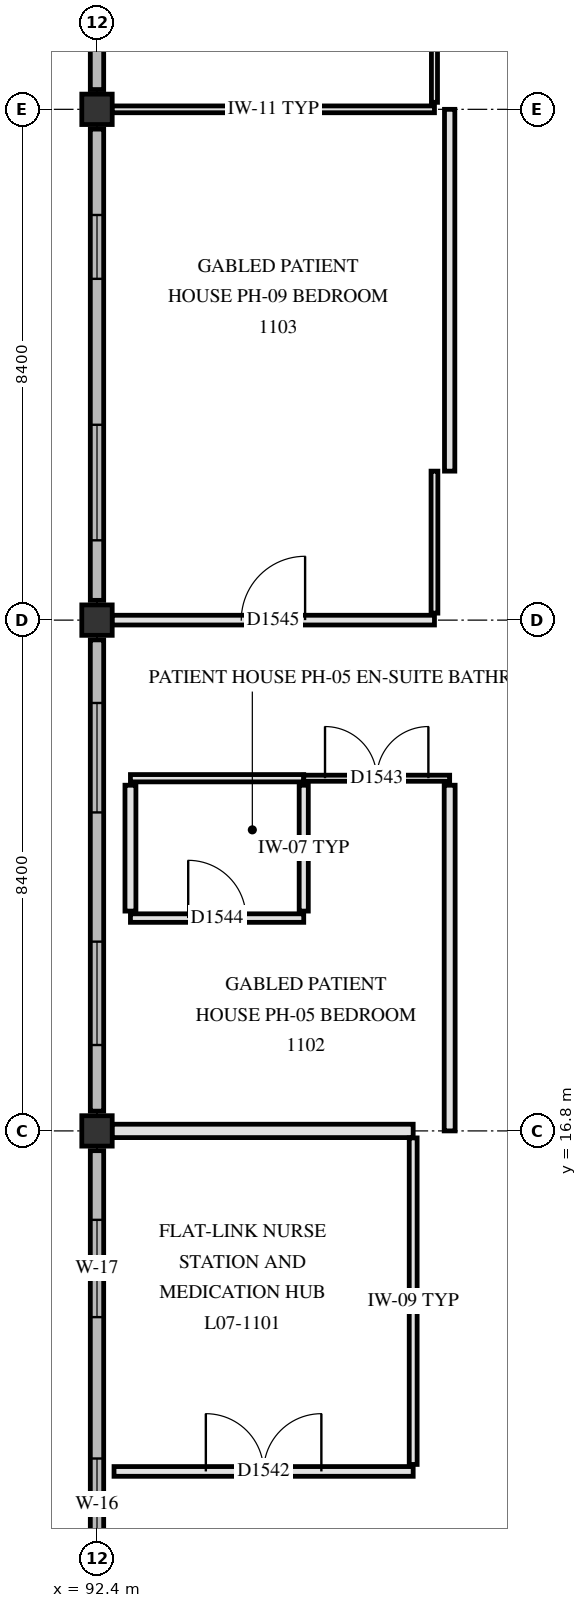
"""IFC4 building model, lengths in metres.
Left out: names, types, materials, properties, quantities, classifications, styles, units other than length and angle.
Written with IfcOpenShell. Run it as: python <this file> out.ifc"""

import sys

from ifc_helpers import new_model, si_unit, direction, frame, frame_2d, origin, origin_2d, place, context, subcontext, project, spatial, polyline, rectangle, outline, extrude, element, fill, save


model = new_model("IFC4")
c1 = context("Model", 3, precision=1e-05, world=origin(), true_north=direction((0.0, 1.0)))
c2 = subcontext(c1, "Body", "Model", "MODEL_VIEW")
j1 = project(units=[si_unit("LENGTHUNIT", "METRE"), si_unit("PLANEANGLEUNIT", "RADIAN")], contexts=[c1])
p1 = place(None, origin())
s1 = spatial("IfcSite", under=j1, at=p1, CompositionType="ELEMENT")
p2 = place(p1, origin())
s2 = spatial("IfcBuilding", under=s1, at=p2, CompositionType="ELEMENT")
p3 = place(p2, frame((0.0, 0.0, 30.3)))
s3 = spatial("IfcBuildingStorey", under=s2, at=p3, CompositionType="ELEMENT", Elevation=30.3)
for number, where, z_axis, x_axis in (
    (1, (92.4, 16.8, 0.0), (0.0, 0.0, 1.0), (1.0, 0.0, 0.0)),
    (2, (92.4, 25.2, 0.0), (0.0, 0.0, 1.0), (1.0, 0.0, 0.0)),
    (3, (92.4, 33.6, 0.0), (0.0, 0.0, 1.0), (1.0, 0.0, 0.0)),
):
    element("IfcColumn", number, at=place(p3, frame(where, z_axis=z_axis, x_axis=x_axis)), inside=s3, PredefinedType="COLUMN", context=c2, shape_type="SweptSolid", body=[
        extrude(rectangle(XDim=0.5, YDim=0.5, at=origin_2d()), origin(), (0.0, 0.0, 1.0), 3.9),
    ])
p4 = place(p3, frame((92.4, 8.725, 0.0), z_axis=(0.0, 0.0, 1.0), x_axis=(0.0, 1.0, 0.0)))
e4 = element("IfcWall", 4, at=p4, inside=s3, PredefinedType="SOLIDWALL", context=c2, shape_type="SweptSolid", body=[
    extrude(rectangle(XDim=7.75, YDim=0.22, at=frame_2d((3.875, 0.0))), origin(), (0.0, 0.0, 1.0), 3.42),
])
p5 = place(p4, frame((1.188, 0.0, 0.85)))
e5 = element("IfcOpeningElement", 5, at=p5, cuts=e4, PredefinedType="OPENING", context=c2, shape_type="SweptSolid", body=[
    extrude(rectangle(XDim=1.5, YDim=1.42, at=frame_2d((0.75, 0.71))), frame((0.0, 0.12, 0.0), z_axis=(0.0, -1.0, 0.0), x_axis=(1.0, 0.0, 0.0)), (0.0, 0.0, 1.0), 0.24),
])
p6 = place(p4, frame((5.012, 0.0, 0.85)))
e6 = element("IfcOpeningElement", 6, at=p6, cuts=e4, PredefinedType="OPENING", context=c2, shape_type="SweptSolid", body=[
    extrude(rectangle(XDim=1.6, YDim=1.42, at=frame_2d((0.8, 0.71))), frame((0.0, 0.12, 0.0), z_axis=(0.0, -1.0, 0.0), x_axis=(1.0, 0.0, 0.0)), (0.0, 0.0, 1.0), 0.24),
])
p7 = place(p3, frame((92.4, 17.125, 0.0), z_axis=(0.0, 0.0, 1.0), x_axis=(0.0, 1.0, 0.0)))
e7 = element("IfcWall", 7, at=p7, inside=s3, PredefinedType="SOLIDWALL", context=c2, shape_type="SweptSolid", body=[
    extrude(rectangle(XDim=7.75, YDim=0.22, at=frame_2d((3.875, 0.0))), origin(), (0.0, 0.0, 1.0), 3.42),
])
p8 = place(p7, frame((1.087, 0.0, 0.85)))
e8 = element("IfcOpeningElement", 8, at=p8, cuts=e7, PredefinedType="OPENING", context=c2, shape_type="SweptSolid", body=[
    extrude(rectangle(XDim=1.7, YDim=1.42, at=frame_2d((0.85, 0.71))), frame((0.0, 0.12, 0.0), z_axis=(0.0, -1.0, 0.0), x_axis=(1.0, 0.0, 0.0)), (0.0, 0.0, 1.0), 0.24),
])
p9 = place(p7, frame((4.913, 0.0, 0.85)))
e9 = element("IfcOpeningElement", 9, at=p9, cuts=e7, PredefinedType="OPENING", context=c2, shape_type="SweptSolid", body=[
    extrude(rectangle(XDim=1.8, YDim=1.42, at=frame_2d((0.9, 0.71))), frame((0.0, 0.12, 0.0), z_axis=(0.0, -1.0, 0.0), x_axis=(1.0, 0.0, 0.0)), (0.0, 0.0, 1.0), 0.24),
])
p10 = place(p3, frame((92.4, 25.525, 0.0), z_axis=(0.0, 0.0, 1.0), x_axis=(0.0, 1.0, 0.0)))
e10 = element("IfcWall", 10, at=p10, inside=s3, PredefinedType="SOLIDWALL", context=c2, shape_type="SweptSolid", body=[
    extrude(outline(polyline([(0.0, 0.0), (7.75, 0.0), (7.75, 3.42), (3.875, 5.76), (0.0, 3.42), (0.0, 0.0)])), frame((0.0, 0.11, 0.0), z_axis=(0.0, -1.0, 0.0), x_axis=(1.0, 0.0, 0.0)), (0.0, 0.0, 1.0), 0.22),
])
p11 = place(p10, frame((0.988, 0.0, 0.85)))
e11 = element("IfcOpeningElement", 11, at=p11, cuts=e10, PredefinedType="OPENING", context=c2, shape_type="SweptSolid", body=[
    extrude(rectangle(XDim=1.9, YDim=1.42, at=frame_2d((0.95, 0.71))), frame((0.0, 0.12, 0.0), z_axis=(0.0, -1.0, 0.0), x_axis=(1.0, 0.0, 0.0)), (0.0, 0.0, 1.0), 0.24),
])
p12 = place(p10, frame((5.288, 0.0, 0.85)))
e12 = element("IfcOpeningElement", 12, at=p12, cuts=e10, PredefinedType="OPENING", context=c2, shape_type="SweptSolid", body=[
    extrude(rectangle(XDim=1.05, YDim=1.54, at=frame_2d((0.525, 0.77))), frame((0.0, 0.12, 0.0), z_axis=(0.0, -1.0, 0.0), x_axis=(1.0, 0.0, 0.0)), (0.0, 0.0, 1.0), 0.24),
])
p13 = place(p3, frame((92.4, 33.925, 0.0), z_axis=(0.0, 0.0, 1.0), x_axis=(0.0, 1.0, 0.0)))
e13 = element("IfcWall", 13, at=p13, inside=s3, PredefinedType="SOLIDWALL", context=c2, shape_type="SweptSolid", body=[
    extrude(outline(polyline([(0.0, 0.0), (7.75, 0.0), (7.75, 3.42), (3.875, 5.76), (0.0, 3.42), (0.0, 0.0)])), frame((0.0, 0.11, 0.0), z_axis=(0.0, -1.0, 0.0), x_axis=(1.0, 0.0, 0.0)), (0.0, 0.0, 1.0), 0.22),
])
p14 = place(p13, frame((1.363, 0.0, 0.85)))
e14 = element("IfcOpeningElement", 14, at=p14, cuts=e13, PredefinedType="OPENING", context=c2, shape_type="SweptSolid", body=[
    extrude(rectangle(XDim=1.15, YDim=1.54, at=frame_2d((0.575, 0.77))), frame((0.0, 0.12, 0.0), z_axis=(0.0, -1.0, 0.0), x_axis=(1.0, 0.0, 0.0)), (0.0, 0.0, 1.0), 0.24),
])
p15 = place(p13, frame((5.188, 0.0, 0.85)))
e15 = element("IfcOpeningElement", 15, at=p15, cuts=e13, PredefinedType="OPENING", context=c2, shape_type="SweptSolid", body=[
    extrude(rectangle(XDim=1.25, YDim=1.54, at=frame_2d((0.625, 0.77))), frame((0.0, 0.12, 0.0), z_axis=(0.0, -1.0, 0.0), x_axis=(1.0, 0.0, 0.0)), (0.0, 0.0, 1.0), 0.24),
])
p16 = place(p3, frame((92.68, 11.2, 0.0), z_axis=(0.0, 0.0, 1.0), x_axis=(1.0, 0.0, 0.0)))
e16 = element("IfcWall", 16, at=p16, inside=s3, PredefinedType="PARTITIONING", context=c2, shape_type="SweptSolid", body=[
    extrude(rectangle(XDim=4.92, YDim=0.16, at=frame_2d((2.46, 0.0))), origin(), (0.0, 0.0, 1.0), 3.41),
])
p17 = place(p16, frame((1.51, 0.0, 0.0)))
e17 = element("IfcOpeningElement", 17, at=p17, cuts=e16, PredefinedType="OPENING", context=c2, shape_type="SweptSolid", body=[
    extrude(rectangle(XDim=1.9, YDim=2.3, at=frame_2d((0.95, 1.15))), frame((0.0, 0.09, 0.0), z_axis=(0.0, -1.0, 0.0), x_axis=(1.0, 0.0, 0.0)), (0.0, 0.0, 1.0), 0.18),
])
p18 = place(p3, frame((92.645, 16.8, 0.0), z_axis=(0.0, 0.0, 1.0), x_axis=(1.0, 0.0, 0.0)))
e18 = element("IfcWall", 18, at=p18, inside=s3, PredefinedType="PARTITIONING", context=c2, shape_type="SweptSolid", body=[
    extrude(rectangle(XDim=4.955, YDim=0.22, at=frame_2d((2.478, 0.0))), origin(), (0.0, 0.0, 1.0), 3.25),
])
p19 = place(p3, frame((92.95, 20.3, 0.0), z_axis=(0.0, 0.0, 1.0), x_axis=(1.0, 0.0, 0.0)))
e19 = element("IfcWall", 19, at=p19, inside=s3, PredefinedType="PARTITIONING", context=c2, shape_type="SweptSolid", body=[
    extrude(rectangle(XDim=2.85, YDim=0.14, at=frame_2d((1.425, 0.0))), origin(), (0.0, 0.0, 1.0), 3.65),
])
p20 = place(p19, frame((0.95, 0.0, 0.0)))
e20 = element("IfcOpeningElement", 20, at=p20, cuts=e19, PredefinedType="OPENING", context=c2, shape_type="SweptSolid", body=[
    extrude(rectangle(XDim=0.95, YDim=2.1, at=frame_2d((0.475, 1.05))), frame((0.0, 0.08, 0.0), z_axis=(0.0, -1.0, 0.0), x_axis=(1.0, 0.0, 0.0)), (0.0, 0.0, 1.0), 0.16),
])
p21 = place(p3, frame((92.95, 22.6, 0.0), z_axis=(0.0, 0.0, 1.0), x_axis=(1.0, 0.0, 0.0)))
e21 = element("IfcWall", 21, at=p21, inside=s3, PredefinedType="PARTITIONING", context=c2, shape_type="SweptSolid", body=[
    extrude(rectangle(XDim=2.85, YDim=0.12, at=frame_2d((1.425, 0.0))), origin(), (0.0, 0.0, 1.0), 3.65),
])
p22 = place(p3, frame((95.8, 22.6, 0.0), z_axis=(0.0, 0.0, 1.0), x_axis=(1.0, 0.0, 0.0)))
e22 = element("IfcWall", 22, at=p22, inside=s3, PredefinedType="PARTITIONING", context=c2, shape_type="SweptSolid", body=[
    extrude(rectangle(XDim=2.4, YDim=0.1, at=frame_2d((1.2, 0.0))), origin(), (0.0, 0.0, 1.0), 3.65),
])
p23 = place(p22, frame((0.35, 0.0, 0.0)))
e23 = element("IfcOpeningElement", 23, at=p23, cuts=e22, PredefinedType="OPENING", context=c2, shape_type="SweptSolid", body=[
    extrude(rectangle(XDim=1.7, YDim=2.25, at=frame_2d((0.85, 1.125))), frame((0.0, 0.06, 0.0), z_axis=(0.0, -1.0, 0.0), x_axis=(1.0, 0.0, 0.0)), (0.0, 0.0, 1.0), 0.12),
])
p24 = place(p3, frame((92.645, 25.2, 0.0), z_axis=(0.0, 0.0, 1.0), x_axis=(1.0, 0.0, 0.0)))
e24 = element("IfcWall", 24, at=p24, inside=s3, PredefinedType="PARTITIONING", context=c2, shape_type="SweptSolid", body=[
    extrude(rectangle(XDim=5.305, YDim=0.16, at=frame_2d((2.652, 0.0))), origin(), (0.0, 0.0, 1.0), 3.25),
])
p25 = place(p24, frame((2.127, 0.0, 0.0)))
e25 = element("IfcOpeningElement", 25, at=p25, cuts=e24, PredefinedType="OPENING", context=c2, shape_type="SweptSolid", body=[
    extrude(rectangle(XDim=1.05, YDim=2.15, at=frame_2d((0.525, 1.075))), frame((0.0, 0.09, 0.0), z_axis=(0.0, -1.0, 0.0), x_axis=(1.0, 0.0, 0.0)), (0.0, 0.0, 1.0), 0.18),
])
p26 = place(p3, frame((92.645, 33.6, 0.0), z_axis=(0.0, 0.0, 1.0), x_axis=(1.0, 0.0, 0.0)))
e26 = element("IfcWall", 26, at=p26, inside=s3, PredefinedType="PARTITIONING", context=c2, shape_type="SweptSolid", body=[
    extrude(rectangle(XDim=5.305, YDim=0.112, at=frame_2d((2.652, 0.0))), origin(), (0.0, 0.0, 1.0), 3.25),
])
p27 = place(p3, frame((92.95, 20.415, 0.0), z_axis=(0.0, 0.0, 1.0), x_axis=(0.0, 1.0, 0.0)))
e27 = element("IfcWall", 27, at=p27, inside=s3, PredefinedType="PARTITIONING", context=c2, shape_type="SweptSolid", body=[
    extrude(rectangle(XDim=2.07, YDim=0.18, at=frame_2d((1.035, 0.0))), origin(), (0.0, 0.0, 1.0), 3.41),
])
p28 = place(p3, frame((95.8, 20.415, 0.0), z_axis=(0.0, 0.0, 1.0), x_axis=(0.0, 1.0, 0.0)))
e28 = element("IfcWall", 28, at=p28, inside=s3, PredefinedType="PARTITIONING", context=c2, shape_type="SweptSolid", body=[
    extrude(rectangle(XDim=2.07, YDim=0.15, at=frame_2d((1.035, 0.0))), origin(), (0.0, 0.0, 1.0), 3.41),
])
p29 = place(p3, frame((97.6, 11.315, 0.0), z_axis=(0.0, 0.0, 1.0), x_axis=(0.0, 1.0, 0.0)))
e29 = element("IfcWall", 29, at=p29, inside=s3, PredefinedType="PARTITIONING", context=c2, shape_type="SweptSolid", body=[
    extrude(rectangle(XDim=5.37, YDim=0.13, at=frame_2d((2.685, 0.0))), origin(), (0.0, 0.0, 1.0), 3.41),
])
p30 = place(p3, frame((97.95, 25.315, 0.0), z_axis=(0.0, 0.0, 1.0), x_axis=(0.0, 1.0, 0.0)))
e30 = element("IfcWall", 30, at=p30, inside=s3, PredefinedType="PARTITIONING", context=c2, shape_type="SweptSolid", body=[
    extrude(rectangle(XDim=2.335, YDim=0.112, at=frame_2d((1.167, 0.0))), origin(), (0.0, 0.0, 1.0), 3.65),
])
p31 = place(p3, frame((97.95, 33.715, 0.0), z_axis=(0.0, 0.0, 1.0), x_axis=(0.0, 1.0, 0.0)))
e31 = element("IfcWall", 31, at=p31, inside=s3, PredefinedType="PARTITIONING", context=c2, shape_type="SweptSolid", body=[
    extrude(rectangle(XDim=2.335, YDim=0.1, at=frame_2d((1.167, 0.0))), origin(), (0.0, 0.0, 1.0), 3.65),
])
p32 = place(p3, frame((98.2, 16.8, 0.0), z_axis=(0.0, 0.0, 1.0), x_axis=(0.0, 1.0, 0.0)))
e32 = element("IfcWall", 32, at=p32, inside=s3, PredefinedType="PARTITIONING", context=c2, shape_type="SweptSolid", body=[
    extrude(rectangle(XDim=5.685, YDim=0.18, at=frame_2d((2.843, 0.0))), origin(), (0.0, 0.0, 1.0), 3.25),
])
p33 = place(p3, frame((98.2, 27.65, 0.0), z_axis=(0.0, 0.0, 1.0), x_axis=(0.0, 1.0, 0.0)))
e33 = element("IfcWall", 33, at=p33, inside=s3, PredefinedType="PARTITIONING", context=c2, shape_type="SweptSolid", body=[
    extrude(rectangle(XDim=5.95, YDim=0.17, at=frame_2d((2.975, 0.0))), origin(), (0.0, 0.0, 1.0), 3.25),
])
p34 = place(p5, origin())
e34 = element("IfcWindow", 34, at=p34, inside=s3, PartitioningType="SINGLE_PANEL", PredefinedType="WINDOW", context=c2, shape_type="SweptSolid", body=[
    extrude(rectangle(XDim=1.5, YDim=1.42, at=frame_2d((0.75, 0.71))), frame((0.0, 0.03, 0.0), z_axis=(0.0, -1.0, 0.0), x_axis=(1.0, 0.0, 0.0)), (0.0, 0.0, 1.0), 0.06),
])
fill(e5, e34)
p35 = place(p6, origin())
e35 = element("IfcWindow", 35, at=p35, inside=s3, PartitioningType="SINGLE_PANEL", PredefinedType="WINDOW", context=c2, shape_type="SweptSolid", body=[
    extrude(rectangle(XDim=1.6, YDim=1.42, at=frame_2d((0.8, 0.71))), frame((0.0, 0.03, 0.0), z_axis=(0.0, -1.0, 0.0), x_axis=(1.0, 0.0, 0.0)), (0.0, 0.0, 1.0), 0.06),
])
fill(e6, e35)
p36 = place(p8, origin())
e36 = element("IfcWindow", 36, at=p36, inside=s3, PartitioningType="SINGLE_PANEL", PredefinedType="WINDOW", context=c2, shape_type="SweptSolid", body=[
    extrude(rectangle(XDim=1.7, YDim=1.42, at=frame_2d((0.85, 0.71))), frame((0.0, 0.03, 0.0), z_axis=(0.0, -1.0, 0.0), x_axis=(1.0, 0.0, 0.0)), (0.0, 0.0, 1.0), 0.06),
])
fill(e8, e36)
p37 = place(p9, origin())
e37 = element("IfcWindow", 37, at=p37, inside=s3, PartitioningType="SINGLE_PANEL", PredefinedType="WINDOW", context=c2, shape_type="SweptSolid", body=[
    extrude(rectangle(XDim=1.8, YDim=1.42, at=frame_2d((0.9, 0.71))), frame((0.0, 0.03, 0.0), z_axis=(0.0, -1.0, 0.0), x_axis=(1.0, 0.0, 0.0)), (0.0, 0.0, 1.0), 0.06),
])
fill(e9, e37)
p38 = place(p11, origin())
e38 = element("IfcWindow", 38, at=p38, inside=s3, PartitioningType="SINGLE_PANEL", PredefinedType="WINDOW", context=c2, shape_type="SweptSolid", body=[
    extrude(rectangle(XDim=1.9, YDim=1.42, at=frame_2d((0.95, 0.71))), frame((0.0, 0.03, 0.0), z_axis=(0.0, -1.0, 0.0), x_axis=(1.0, 0.0, 0.0)), (0.0, 0.0, 1.0), 0.06),
])
fill(e11, e38)
p39 = place(p12, origin())
e39 = element("IfcWindow", 39, at=p39, inside=s3, PartitioningType="SINGLE_PANEL", PredefinedType="WINDOW", context=c2, shape_type="SweptSolid", body=[
    extrude(rectangle(XDim=1.05, YDim=1.54, at=frame_2d((0.525, 0.77))), frame((0.0, 0.03, 0.0), z_axis=(0.0, -1.0, 0.0), x_axis=(1.0, 0.0, 0.0)), (0.0, 0.0, 1.0), 0.06),
])
fill(e12, e39)
p40 = place(p17, origin())
e40 = element("IfcDoor", 40, at=p40, inside=s3, OperationType="DOUBLE_SWING_LEFT", PredefinedType="DOOR", context=c2, shape_type="SweptSolid", body=[
    extrude(rectangle(XDim=1.9, YDim=2.3, at=frame_2d((0.95, 1.15))), frame((0.0, 0.025, 0.0), z_axis=(0.0, -1.0, 0.0), x_axis=(1.0, 0.0, 0.0)), (0.0, 0.0, 1.0), 0.05),
])
fill(e17, e40)
p41 = place(p23, origin())
e41 = element("IfcDoor", 41, at=p41, inside=s3, OperationType="DOUBLE_SWING_RIGHT", PredefinedType="DOOR", context=c2, shape_type="SweptSolid", body=[
    extrude(rectangle(XDim=1.7, YDim=2.25, at=frame_2d((0.85, 1.125))), frame((0.0, 0.025, 0.0), z_axis=(0.0, -1.0, 0.0), x_axis=(1.0, 0.0, 0.0)), (0.0, 0.0, 1.0), 0.05),
])
fill(e23, e41)
p42 = place(p20, origin())
e42 = element("IfcDoor", 42, at=p42, inside=s3, OperationType="SINGLE_SWING_LEFT", PredefinedType="DOOR", context=c2, shape_type="SweptSolid", body=[
    extrude(rectangle(XDim=0.95, YDim=2.1, at=frame_2d((0.475, 1.05))), frame((0.0, 0.025, 0.0), z_axis=(0.0, -1.0, 0.0), x_axis=(1.0, 0.0, 0.0)), (0.0, 0.0, 1.0), 0.05),
])
fill(e20, e42)
p43 = place(p25, origin())
e43 = element("IfcDoor", 43, at=p43, inside=s3, OperationType="SINGLE_SWING_RIGHT", PredefinedType="DOOR", context=c2, shape_type="SweptSolid", body=[
    extrude(rectangle(XDim=1.05, YDim=2.15, at=frame_2d((0.525, 1.075))), frame((0.0, 0.025, 0.0), z_axis=(0.0, -1.0, 0.0), x_axis=(1.0, 0.0, 0.0)), (0.0, 0.0, 1.0), 0.05),
])
fill(e25, e43)
save(model, sys.argv[1])
